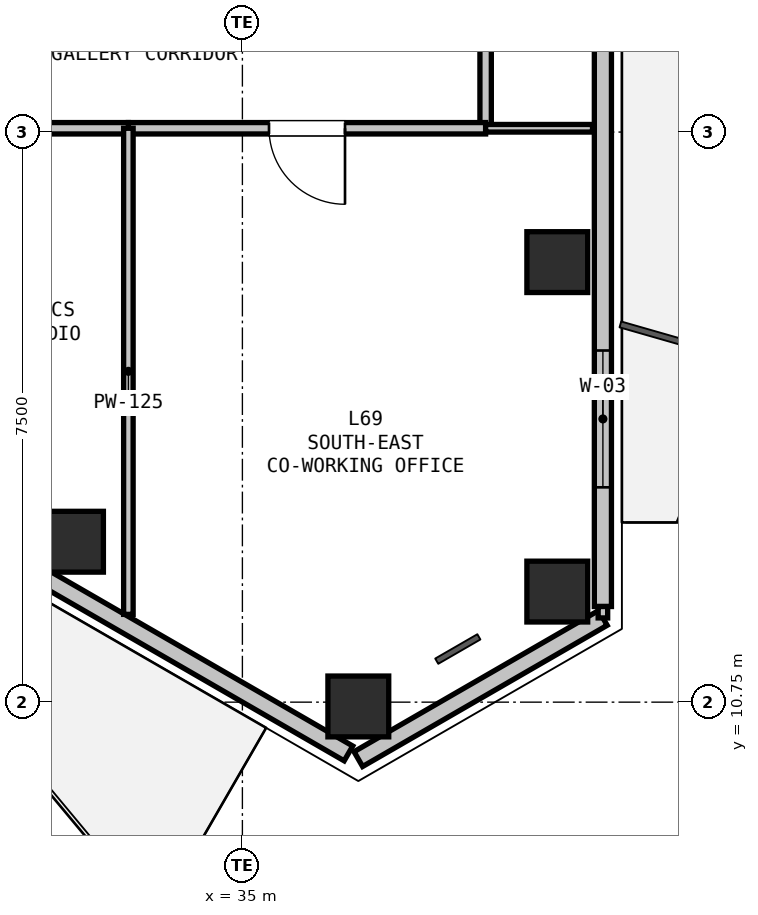
"""IFC4 building model, lengths in metres.
Left out: names, types, materials, properties, quantities, classifications, styles, units other than length and angle.
Written with IfcOpenShell. Run it as: python <this file> out.ifc"""

import sys

from ifc_helpers import new_model, si_unit, direction, frame, frame_2d, origin, origin_2d, place, context, subcontext, project, spatial, rectangle, hollow_rectangle, extrude, element, fill, save


model = new_model("IFC4")
c1 = context("Model", 3, precision=1e-05, world=origin(), true_north=direction((0.0, 1.0)))
c2 = subcontext(c1, "Body", "Model", "MODEL_VIEW")
j1 = project(units=[si_unit("LENGTHUNIT", "METRE"), si_unit("PLANEANGLEUNIT", "RADIAN")], contexts=[c1])
p1 = place(None, origin())
s1 = spatial("IfcSite", under=j1, at=p1, CompositionType="ELEMENT")
p2 = place(p1, origin())
s2 = spatial("IfcBuilding", under=s1, at=p2, CompositionType="ELEMENT")
p3 = place(p2, frame((0.0, 0.0, 246.3)))
s3 = spatial("IfcBuildingStorey", under=s2, at=p3, CompositionType="ELEMENT", Elevation=246.3)
for number, where, z_axis, x_axis in (
    (1, (39.143, 16.539, 0.0), (0.0, 0.0, 1.0), (1.0, 0.0, 0.0)),
    (2, (39.143, 12.205, 0.0), (0.0, 0.0, 1.0), (1.0, 0.0, 0.0)),
    (3, (36.525, 10.693, 0.0), (0.0, 0.0, 1.0), (1.0, 0.0, 0.0)),
    (4, (32.771, 12.861, 0.0), (0.0, 0.0, 1.0), (1.0, 0.0, 0.0)),
):
    element("IfcColumn", number, at=place(p3, frame(where, z_axis=z_axis, x_axis=x_axis)), inside=s3, PredefinedType="COLUMN", context=c2, shape_type="SweptSolid", body=[
        extrude(hollow_rectangle(XDim=0.8, YDim=0.8, WallThickness=0.025, at=origin_2d()), origin(), (0.0, 0.0, 1.0), 3.3),
    ])
p4 = place(p3, frame((39.743, 11.858, 0.0), z_axis=(0.0, 0.0, 1.0), x_axis=(-0.866038962515, -0.499976514854, 0.0)))
e5 = element("IfcWall", 5, at=p4, inside=s3, PredefinedType="SOLIDWALL", context=c2, shape_type="SweptSolid", body=[
    extrude(rectangle(XDim=3.716, YDim=0.225, at=frame_2d((1.858, 0.0))), origin(), (0.0, 0.0, 1.0), 2.64),
])
p5 = place(p3, frame((39.743, 20.936, 0.0), z_axis=(0.0, 0.0, 1.0), x_axis=(0.0, -1.0, 0.0)))
e6 = element("IfcWall", 6, at=p5, inside=s3, PredefinedType="SOLIDWALL", context=c2, shape_type="SweptSolid", body=[
    extrude(rectangle(XDim=8.928, YDim=0.225, at=frame_2d((4.464, 0.0))), origin(), (0.0, 0.0, 1.0), 2.64),
])
p6 = place(p5, frame((5.56, 0.0, 0.9)))
e7 = element("IfcOpeningElement", 7, at=p6, cuts=e6, PredefinedType="OPENING", context=c2, shape_type="SweptSolid", body=[
    extrude(rectangle(XDim=1.8, YDim=1.5, at=frame_2d((0.9, 0.75))), frame((0.0, 0.123, 0.0), z_axis=(0.0, -1.0, 0.0), x_axis=(1.0, 0.0, 0.0)), (0.0, 0.0, 1.0), 0.245),
])
p7 = place(p3, frame((36.395, 10.076, 0.0), z_axis=(0.0, 0.0, 1.0), x_axis=(-0.866026655105, 0.499997832642, 0.0)))
e8 = element("IfcWall", 8, at=p7, inside=s3, PredefinedType="SOLIDWALL", context=c2, shape_type="SweptSolid", body=[
    extrude(rectangle(XDim=8.928, YDim=0.225, at=frame_2d((4.464, 0.0))), origin(), (0.0, 0.0, 1.0), 2.64),
])
p8 = place(p7, frame((6.302, 0.0, 0.0)))
e9 = element("IfcOpeningElement", 9, at=p8, cuts=e8, PredefinedType="OPENING", context=c2, shape_type="SweptSolid", body=[
    extrude(rectangle(XDim=1.0, YDim=2.1, at=frame_2d((0.5, 1.05))), frame((0.0, 0.123, 0.0), z_axis=(0.0, -1.0, 0.0), x_axis=(1.0, 0.0, 0.0)), (0.0, 0.0, 1.0), 0.245),
])
p9 = place(p3, frame((38.2, 20.75, 0.0), z_axis=(0.0, 0.0, 1.0), x_axis=(0.0, -1.0, 0.0)))
e10 = element("IfcWall", 10, at=p9, inside=s3, PredefinedType="PARTITIONING", context=c2, shape_type="SweptSolid", body=[
    extrude(rectangle(XDim=2.45, YDim=0.15, at=frame_2d((1.225, 0.0))), origin(), (0.0, 0.0, 1.0), 3.02),
])
p10 = place(p3, frame((38.2, 18.3, 0.0), z_axis=(0.0, 0.0, 1.0), x_axis=(-1.0, 0.0, 0.0)))
e11 = element("IfcWall", 11, at=p10, inside=s3, PredefinedType="PARTITIONING", context=c2, shape_type="SweptSolid", body=[
    extrude(rectangle(XDim=4.7, YDim=0.15, at=frame_2d((2.35, 0.0))), origin(), (0.0, 0.0, 1.0), 2.468),
])
p11 = place(p10, frame((1.85, 0.0, 0.0)))
e12 = element("IfcOpeningElement", 12, at=p11, cuts=e11, PredefinedType="OPENING", context=c2, shape_type="SweptSolid", body=[
    extrude(rectangle(XDim=1.0, YDim=2.15, at=frame_2d((0.5, 1.075))), frame((0.0, 0.085, 0.0), z_axis=(0.0, -1.0, 0.0), x_axis=(1.0, 0.0, 0.0)), (0.0, 0.0, 1.0), 0.17),
])
p12 = place(p3, frame((33.5, 18.3, 0.0), z_axis=(0.0, 0.0, 1.0), x_axis=(-1.0, 0.0, 0.0)))
e13 = element("IfcWall", 13, at=p12, inside=s3, PredefinedType="PARTITIONING", context=c2, shape_type="SweptSolid", body=[
    extrude(rectangle(XDim=5.9, YDim=0.15, at=frame_2d((2.95, 0.0))), origin(), (0.0, 0.0, 1.0), 3.02),
])
p13 = place(p12, frame((2.45, 0.0, 0.0)))
e14 = element("IfcOpeningElement", 14, at=p13, cuts=e13, PredefinedType="OPENING", context=c2, shape_type="SweptSolid", body=[
    extrude(rectangle(XDim=1.0, YDim=2.15, at=frame_2d((0.5, 1.075))), frame((0.0, 0.085, 0.0), z_axis=(0.0, -1.0, 0.0), x_axis=(1.0, 0.0, 0.0)), (0.0, 0.0, 1.0), 0.17),
])
p14 = place(p3, frame((33.5, 18.3, 0.0), z_axis=(0.0, 0.0, 1.0), x_axis=(0.0, -1.0, 0.0)))
e15 = element("IfcWall", 15, at=p14, inside=s3, PredefinedType="PARTITIONING", context=c2, shape_type="SweptSolid", body=[
    extrude(rectangle(XDim=6.395, YDim=0.125, at=frame_2d((3.198, 0.0))), origin(), (0.0, 0.0, 1.0), 2.745),
])
p15 = place(p3, frame((38.2, 18.3, 0.0), z_axis=(0.0, 0.0, 1.0), x_axis=(1.0, 0.0, 0.0)))
e16 = element("IfcWall", 16, at=p15, inside=s3, PredefinedType="PARTITIONING", context=c2, shape_type="SweptSolid", body=[
    extrude(rectangle(XDim=1.406, YDim=0.1, at=frame_2d((0.703, 0.0))), origin(), (0.0, 0.0, 1.0), 2.365),
])
p16 = place(p3, frame((39.743, 12.008, 0.0), z_axis=(0.0, 0.0, 1.0), x_axis=(0.0, -1.0, 0.0)))
e17 = element("IfcWall", 17, at=p16, inside=s3, PredefinedType="PARTITIONING", context=c2, shape_type="SweptSolid", body=[
    extrude(rectangle(XDim=0.15, YDim=0.125, at=frame_2d((0.075, 0.0))), origin(), (0.0, 0.0, 1.0), 3.02),
])
p17 = place(p6, origin())
e18 = element("IfcWindow", 18, at=p17, inside=s3, PartitioningType="SINGLE_PANEL", PredefinedType="WINDOW", context=c2, shape_type="SweptSolid", body=[
    extrude(rectangle(XDim=1.8, YDim=1.5, at=frame_2d((0.9, 0.75))), frame((0.0, 0.03, 0.0), z_axis=(0.0, -1.0, 0.0), x_axis=(1.0, 0.0, 0.0)), (0.0, 0.0, 1.0), 0.06),
])
fill(e7, e18)
p18 = place(p11, origin())
e19 = element("IfcDoor", 19, at=p18, inside=s3, OperationType="SINGLE_SWING_LEFT", PredefinedType="DOOR", context=c2, shape_type="SweptSolid", body=[
    extrude(rectangle(XDim=1.0, YDim=2.15, at=frame_2d((0.5, 1.075))), frame((0.0, 0.025, 0.0), z_axis=(0.0, -1.0, 0.0), x_axis=(1.0, 0.0, 0.0)), (0.0, 0.0, 1.0), 0.05),
])
fill(e12, e19)
save(model, sys.argv[1])
